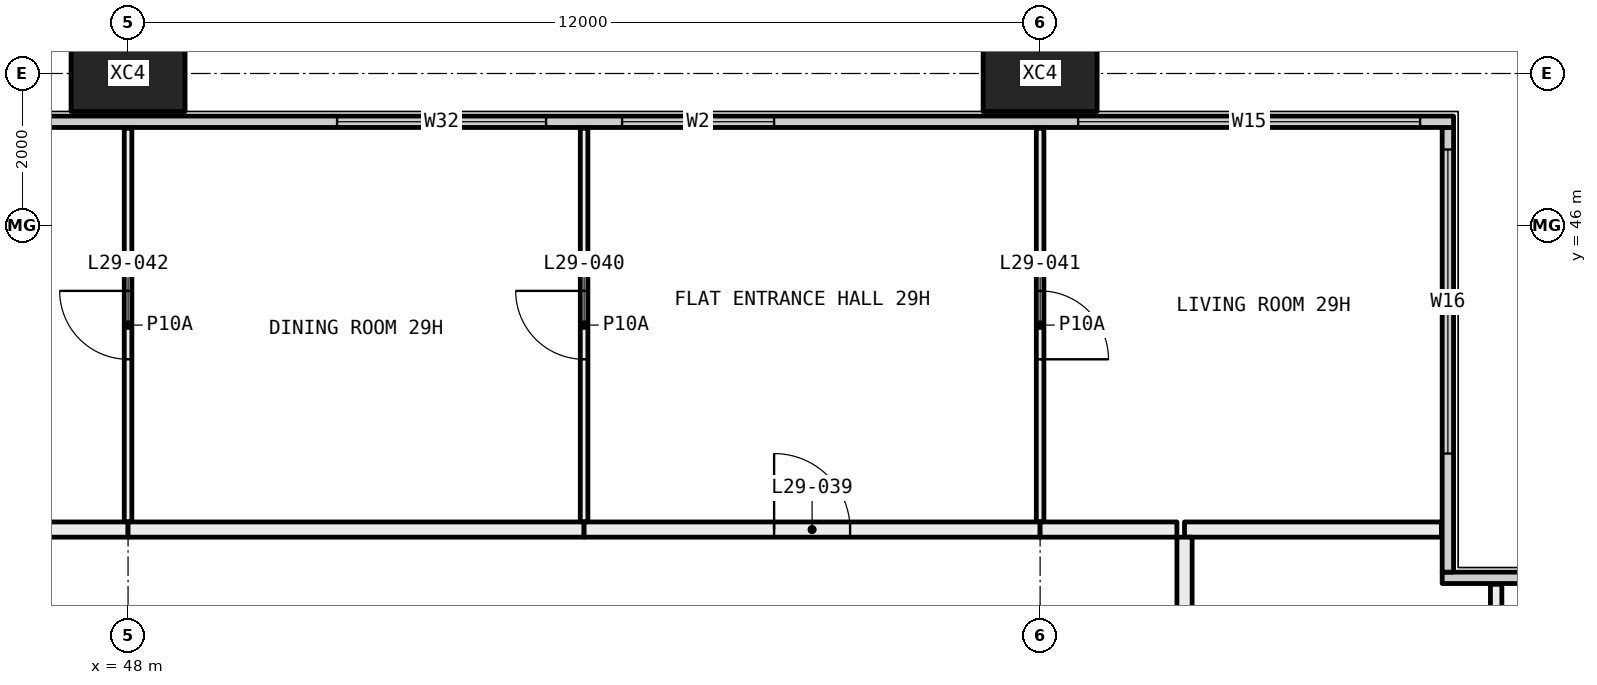
"""IFC4 building model, lengths in metres.
Left out: names, types, materials, properties, quantities, classifications, styles, units other than length and angle.
Written with IfcOpenShell. Run it as: python <this file> out.ifc"""

import sys

from ifc_helpers import new_model, si_unit, direction, frame, frame_2d, origin, origin_2d, place, context, subcontext, project, spatial, rectangle, hollow_rectangle, extrude, element, fill, save


model = new_model("IFC4")
c1 = context("Model", 3, precision=1e-05, world=origin(), true_north=direction((0.0, 1.0)))
c2 = subcontext(c1, "Body", "Model", "MODEL_VIEW")
j1 = project(units=[si_unit("LENGTHUNIT", "METRE"), si_unit("PLANEANGLEUNIT", "RADIAN")], contexts=[c1])
p1 = place(None, origin())
s1 = spatial("IfcSite", under=j1, at=p1, CompositionType="ELEMENT")
p2 = place(p1, origin())
s2 = spatial("IfcBuilding", under=s1, at=p2, CompositionType="ELEMENT")
p3 = place(p2, frame((0.0, 0.0, 113.85)))
s3 = spatial("IfcBuildingStorey", under=s2, at=p3, CompositionType="ELEMENT", Elevation=113.85)
for number, where, z_axis, x_axis in (
    (1, (48.0, 48.0, -0.4), (0.0, 0.0, 1.0), (1.0, 0.0, 0.0)),
    (2, (60.0, 48.0, -0.4), (0.0, 0.0, 1.0), (1.0, 0.0, 0.0)),
):
    element("IfcColumn", number, at=place(p3, frame(where, z_axis=z_axis, x_axis=x_axis)), inside=s3, PredefinedType="COLUMN", context=c2, shape_type="SweptSolid", body=[
        extrude(hollow_rectangle(XDim=1.5, YDim=1.0, WallThickness=0.06, at=origin_2d()), origin(), (0.0, 0.0, 1.0), 3.45),
    ])
p4 = place(p3, frame((65.29, 41.365, 0.0), z_axis=(0.0, 0.0, 1.0), x_axis=(1.0, 0.0, 0.0)))
e3 = element("IfcWall", 3, at=p4, inside=s3, PredefinedType="ELEMENTEDWALL", context=c2, shape_type="SweptSolid", body=[
    extrude(rectangle(XDim=6.15, YDim=0.15, at=frame_2d((3.075, 0.0))), origin(), (0.0, 0.0, 1.0), 3.05),
])
p5 = place(p4, frame((1.71, 0.0, 0.45)))
e4 = element("IfcOpeningElement", 4, at=p5, cuts=e3, PredefinedType="OPENING", context=c2, shape_type="SweptSolid", body=[
    extrude(rectangle(XDim=4.0, YDim=2.55, at=frame_2d((2.0, 1.275))), frame((0.0, 0.085, 0.0), z_axis=(0.0, -1.0, 0.0), x_axis=(1.0, 0.0, 0.0)), (0.0, 0.0, 1.0), 0.17),
])
p6 = place(p3, frame((65.365, 41.44, 0.0), z_axis=(0.0, 0.0, 1.0), x_axis=(0.0, 1.0, 0.0)))
e5 = element("IfcWall", 5, at=p6, inside=s3, PredefinedType="ELEMENTEDWALL", context=c2, shape_type="SweptSolid", body=[
    extrude(rectangle(XDim=5.85, YDim=0.15, at=frame_2d((2.925, 0.0))), origin(), (0.0, 0.0, 1.0), 3.05),
])
p7 = place(p6, frame((1.56, 0.0, 0.45)))
e6 = element("IfcOpeningElement", 6, at=p7, cuts=e5, PredefinedType="OPENING", context=c2, shape_type="SweptSolid", body=[
    extrude(rectangle(XDim=4.0, YDim=2.55, at=frame_2d((2.0, 1.275))), frame((0.0, 0.085, 0.0), z_axis=(0.0, -1.0, 0.0), x_axis=(1.0, 0.0, 0.0)), (0.0, 0.0, 1.0), 0.17),
])
p8 = place(p3, frame((6.56, 47.365, 0.0), z_axis=(0.0, 0.0, 1.0), x_axis=(1.0, 0.0, 0.0)))
e7 = element("IfcWall", 7, at=p8, inside=s3, PredefinedType="ELEMENTEDWALL", context=c2, shape_type="SweptSolid", body=[
    extrude(rectangle(XDim=58.88, YDim=0.15, at=frame_2d((29.44, 0.0))), origin(), (0.0, 0.0, 1.0), 3.05),
])
p9 = place(p8, frame((0.44, 0.0, 0.45)))
e8 = element("IfcOpeningElement", 8, at=p9, cuts=e7, PredefinedType="OPENING", context=c2, shape_type="SweptSolid", body=[
    extrude(rectangle(XDim=4.5, YDim=2.55, at=frame_2d((2.25, 1.275))), frame((0.0, 0.085, 0.0), z_axis=(0.0, -1.0, 0.0), x_axis=(1.0, 0.0, 0.0)), (0.0, 0.0, 1.0), 0.17),
])
p10 = place(p8, frame((8.19, 0.0, 0.45)))
e9 = element("IfcOpeningElement", 9, at=p10, cuts=e7, PredefinedType="OPENING", context=c2, shape_type="SweptSolid", body=[
    extrude(rectangle(XDim=2.75, YDim=2.55, at=frame_2d((1.375, 1.275))), frame((0.0, 0.085, 0.0), z_axis=(0.0, -1.0, 0.0), x_axis=(1.0, 0.0, 0.0)), (0.0, 0.0, 1.0), 0.17),
])
p11 = place(p8, frame((11.94, 0.0, 0.45)))
e10 = element("IfcOpeningElement", 10, at=p11, cuts=e7, PredefinedType="OPENING", context=c2, shape_type="SweptSolid", body=[
    extrude(rectangle(XDim=2.75, YDim=2.55, at=frame_2d((1.375, 1.275))), frame((0.0, 0.085, 0.0), z_axis=(0.0, -1.0, 0.0), x_axis=(1.0, 0.0, 0.0)), (0.0, 0.0, 1.0), 0.17),
])
p12 = place(p8, frame((20.19, 0.0, 0.45)))
e11 = element("IfcOpeningElement", 11, at=p12, cuts=e7, PredefinedType="OPENING", context=c2, shape_type="SweptSolid", body=[
    extrude(rectangle(XDim=2.75, YDim=2.55, at=frame_2d((1.375, 1.275))), frame((0.0, 0.085, 0.0), z_axis=(0.0, -1.0, 0.0), x_axis=(1.0, 0.0, 0.0)), (0.0, 0.0, 1.0), 0.17),
])
p13 = place(p8, frame((23.94, 0.0, 0.45)))
e12 = element("IfcOpeningElement", 12, at=p13, cuts=e7, PredefinedType="OPENING", context=c2, shape_type="SweptSolid", body=[
    extrude(rectangle(XDim=2.0, YDim=2.55, at=frame_2d((1.0, 1.275))), frame((0.0, 0.085, 0.0), z_axis=(0.0, -1.0, 0.0), x_axis=(1.0, 0.0, 0.0)), (0.0, 0.0, 1.0), 0.17),
])
p14 = place(p8, frame((32.19, 0.0, 0.45)))
e13 = element("IfcOpeningElement", 13, at=p14, cuts=e7, PredefinedType="OPENING", context=c2, shape_type="SweptSolid", body=[
    extrude(rectangle(XDim=2.75, YDim=2.55, at=frame_2d((1.375, 1.275))), frame((0.0, 0.085, 0.0), z_axis=(0.0, -1.0, 0.0), x_axis=(1.0, 0.0, 0.0)), (0.0, 0.0, 1.0), 0.17),
])
p15 = place(p8, frame((35.94, 0.0, 0.45)))
e14 = element("IfcOpeningElement", 14, at=p15, cuts=e7, PredefinedType="OPENING", context=c2, shape_type="SweptSolid", body=[
    extrude(rectangle(XDim=2.75, YDim=2.55, at=frame_2d((1.375, 1.275))), frame((0.0, 0.085, 0.0), z_axis=(0.0, -1.0, 0.0), x_axis=(1.0, 0.0, 0.0)), (0.0, 0.0, 1.0), 0.17),
])
p16 = place(p8, frame((44.19, 0.0, 0.45)))
e15 = element("IfcOpeningElement", 15, at=p16, cuts=e7, PredefinedType="OPENING", context=c2, shape_type="SweptSolid", body=[
    extrude(rectangle(XDim=2.75, YDim=2.55, at=frame_2d((1.375, 1.275))), frame((0.0, 0.085, 0.0), z_axis=(0.0, -1.0, 0.0), x_axis=(1.0, 0.0, 0.0)), (0.0, 0.0, 1.0), 0.17),
])
p17 = place(p8, frame((47.94, 0.0, 0.45)))
e16 = element("IfcOpeningElement", 16, at=p17, cuts=e7, PredefinedType="OPENING", context=c2, shape_type="SweptSolid", body=[
    extrude(rectangle(XDim=2.0, YDim=2.55, at=frame_2d((1.0, 1.275))), frame((0.0, 0.085, 0.0), z_axis=(0.0, -1.0, 0.0), x_axis=(1.0, 0.0, 0.0)), (0.0, 0.0, 1.0), 0.17),
])
p18 = place(p8, frame((53.94, 0.0, 0.45)))
e17 = element("IfcOpeningElement", 17, at=p18, cuts=e7, PredefinedType="OPENING", context=c2, shape_type="SweptSolid", body=[
    extrude(rectangle(XDim=4.5, YDim=2.55, at=frame_2d((2.25, 1.275))), frame((0.0, 0.085, 0.0), z_axis=(0.0, -1.0, 0.0), x_axis=(1.0, 0.0, 0.0)), (0.0, 0.0, 1.0), 0.17),
])
p19 = place(p3, frame((66.0, 41.28, 0.0), z_axis=(0.0, 0.0, 1.0), x_axis=(0.0, -1.0, 0.0)))
e18 = element("IfcWall", 18, at=p19, inside=s3, PredefinedType="PARTITIONING", context=c2, shape_type="SweptSolid", body=[
    extrude(rectangle(XDim=3.78, YDim=0.15, at=frame_2d((1.89, 0.0))), origin(), (0.0, 0.0, 1.0), 3.05),
])
p20 = place(p3, frame((65.28, 42.0, 0.0), z_axis=(0.0, 0.0, 1.0), x_axis=(-1.0, 0.0, 0.0)))
e19 = element("IfcWall", 19, at=p20, inside=s3, PredefinedType="PARTITIONING", context=c2, shape_type="SweptSolid", body=[
    extrude(rectangle(XDim=3.38, YDim=0.2, at=frame_2d((1.69, 0.0))), origin(), (0.0, 0.0, 1.0), 3.05),
])
p21 = place(p3, frame((61.9, 41.9, 0.0), z_axis=(0.0, 0.0, 1.0), x_axis=(0.0, -1.0, 0.0)))
e20 = element("IfcWall", 20, at=p21, inside=s3, PredefinedType="PARTITIONING", context=c2, shape_type="SweptSolid", body=[
    extrude(rectangle(XDim=4.4, YDim=0.2, at=frame_2d((2.2, 0.0))), origin(), (0.0, 0.0, 1.0), 3.05),
])
p22 = place(p3, frame((48.0, 42.1, 0.0), z_axis=(0.0, 0.0, 1.0), x_axis=(0.0, 1.0, 0.0)))
e21 = element("IfcWall", 21, at=p22, inside=s3, PredefinedType="PARTITIONING", context=c2, shape_type="SweptSolid", body=[
    extrude(rectangle(XDim=5.18, YDim=0.1, at=frame_2d((2.59, 0.0))), origin(), (0.0, 0.0, 1.0), 3.05),
])
p23 = place(p22, frame((2.14, 0.0, 0.0)))
e22 = element("IfcOpeningElement", 22, at=p23, cuts=e21, PredefinedType="OPENING", context=c2, shape_type="SweptSolid", body=[
    extrude(rectangle(XDim=0.9, YDim=2.1, at=frame_2d((0.45, 1.05))), frame((0.0, 0.06, 0.0), z_axis=(0.0, -1.0, 0.0), x_axis=(1.0, 0.0, 0.0)), (0.0, 0.0, 1.0), 0.12),
])
p24 = place(p3, frame((46.1, 42.0, 0.0), z_axis=(0.0, 0.0, 1.0), x_axis=(1.0, 0.0, 0.0)))
e23 = element("IfcWall", 23, at=p24, inside=s3, PredefinedType="PARTITIONING", context=c2, shape_type="SweptSolid", body=[
    extrude(rectangle(XDim=1.9, YDim=0.2, at=frame_2d((0.95, 0.0))), origin(), (0.0, 0.0, 1.0), 3.05),
])
p25 = place(p3, frame((54.0, 42.1, 0.0), z_axis=(0.0, 0.0, 1.0), x_axis=(0.0, 1.0, 0.0)))
e24 = element("IfcWall", 24, at=p25, inside=s3, PredefinedType="PARTITIONING", context=c2, shape_type="SweptSolid", body=[
    extrude(rectangle(XDim=5.18, YDim=0.1, at=frame_2d((2.59, 0.0))), origin(), (0.0, 0.0, 1.0), 3.05),
])
p26 = place(p25, frame((2.14, 0.0, 0.0)))
e25 = element("IfcOpeningElement", 25, at=p26, cuts=e24, PredefinedType="OPENING", context=c2, shape_type="SweptSolid", body=[
    extrude(rectangle(XDim=0.9, YDim=2.1, at=frame_2d((0.45, 1.05))), frame((0.0, 0.06, 0.0), z_axis=(0.0, -1.0, 0.0), x_axis=(1.0, 0.0, 0.0)), (0.0, 0.0, 1.0), 0.12),
])
p27 = place(p3, frame((48.0, 42.0, 0.0), z_axis=(0.0, 0.0, 1.0), x_axis=(1.0, 0.0, 0.0)))
e26 = element("IfcWall", 26, at=p27, inside=s3, PredefinedType="PARTITIONING", context=c2, shape_type="SweptSolid", body=[
    extrude(rectangle(XDim=6.0, YDim=0.2, at=frame_2d((3.0, 0.0))), origin(), (0.0, 0.0, 1.0), 3.05),
])
p28 = place(p3, frame((60.0, 42.1, 0.0), z_axis=(0.0, 0.0, 1.0), x_axis=(0.0, 1.0, 0.0)))
e27 = element("IfcWall", 27, at=p28, inside=s3, PredefinedType="PARTITIONING", context=c2, shape_type="SweptSolid", body=[
    extrude(rectangle(XDim=5.18, YDim=0.1, at=frame_2d((2.59, 0.0))), origin(), (0.0, 0.0, 1.0), 3.05),
])
p29 = place(p28, frame((2.14, 0.0, 0.0)))
e28 = element("IfcOpeningElement", 28, at=p29, cuts=e27, PredefinedType="OPENING", context=c2, shape_type="SweptSolid", body=[
    extrude(rectangle(XDim=0.9, YDim=2.1, at=frame_2d((0.45, 1.05))), frame((0.0, 0.06, 0.0), z_axis=(0.0, -1.0, 0.0), x_axis=(1.0, 0.0, 0.0)), (0.0, 0.0, 1.0), 0.12),
])
p30 = place(p3, frame((54.0, 42.0, 0.0), z_axis=(0.0, 0.0, 1.0), x_axis=(1.0, 0.0, 0.0)))
e29 = element("IfcWall", 29, at=p30, inside=s3, PredefinedType="PARTITIONING", context=c2, shape_type="SweptSolid", body=[
    extrude(rectangle(XDim=6.0, YDim=0.2, at=frame_2d((3.0, 0.0))), origin(), (0.0, 0.0, 1.0), 3.05),
])
p31 = place(p30, frame((2.5, 0.0, 0.0)))
e30 = element("IfcOpeningElement", 30, at=p31, cuts=e29, PredefinedType="OPENING", context=c2, shape_type="SweptSolid", body=[
    extrude(rectangle(XDim=1.0, YDim=2.1, at=frame_2d((0.5, 1.05))), frame((0.0, 0.11, 0.0), z_axis=(0.0, -1.0, 0.0), x_axis=(1.0, 0.0, 0.0)), (0.0, 0.0, 1.0), 0.22),
])
p32 = place(p3, frame((60.0, 42.0, 0.0), z_axis=(0.0, 0.0, 1.0), x_axis=(1.0, 0.0, 0.0)))
e31 = element("IfcWall", 31, at=p32, inside=s3, PredefinedType="PARTITIONING", context=c2, shape_type="SweptSolid", body=[
    extrude(rectangle(XDim=1.8, YDim=0.2, at=frame_2d((0.9, 0.0))), origin(), (0.0, 0.0, 1.0), 3.05),
])
p33 = place(p7, origin())
e32 = element("IfcWindow", 32, at=p33, inside=s3, PartitioningType="SINGLE_PANEL", PredefinedType="WINDOW", context=c2, shape_type="SweptSolid", body=[
    extrude(rectangle(XDim=4.0, YDim=2.55, at=frame_2d((2.0, 1.275))), frame((0.0, 0.03, 0.0), z_axis=(0.0, -1.0, 0.0), x_axis=(1.0, 0.0, 0.0)), (0.0, 0.0, 1.0), 0.06),
])
fill(e6, e32)
p34 = place(p16, origin())
e33 = element("IfcWindow", 33, at=p34, inside=s3, PartitioningType="SINGLE_PANEL", PredefinedType="WINDOW", context=c2, shape_type="SweptSolid", body=[
    extrude(rectangle(XDim=2.75, YDim=2.55, at=frame_2d((1.375, 1.275))), frame((0.0, 0.03, 0.0), z_axis=(0.0, -1.0, 0.0), x_axis=(1.0, 0.0, 0.0)), (0.0, 0.0, 1.0), 0.06),
])
fill(e15, e33)
p35 = place(p17, origin())
e34 = element("IfcWindow", 34, at=p35, inside=s3, PartitioningType="SINGLE_PANEL", PredefinedType="WINDOW", context=c2, shape_type="SweptSolid", body=[
    extrude(rectangle(XDim=2.0, YDim=2.55, at=frame_2d((1.0, 1.275))), frame((0.0, 0.03, 0.0), z_axis=(0.0, -1.0, 0.0), x_axis=(1.0, 0.0, 0.0)), (0.0, 0.0, 1.0), 0.06),
])
fill(e16, e34)
p36 = place(p18, origin())
e35 = element("IfcWindow", 35, at=p36, inside=s3, PartitioningType="SINGLE_PANEL", PredefinedType="WINDOW", context=c2, shape_type="SweptSolid", body=[
    extrude(rectangle(XDim=4.5, YDim=2.55, at=frame_2d((2.25, 1.275))), frame((0.0, 0.03, 0.0), z_axis=(0.0, -1.0, 0.0), x_axis=(1.0, 0.0, 0.0)), (0.0, 0.0, 1.0), 0.06),
])
fill(e17, e35)
p37 = place(p31, origin())
e36 = element("IfcDoor", 36, at=p37, inside=s3, OperationType="SINGLE_SWING_RIGHT", PredefinedType="DOOR", context=c2, shape_type="SweptSolid", body=[
    extrude(rectangle(XDim=1.0, YDim=2.1, at=frame_2d((0.5, 1.05))), frame((0.0, 0.025, 0.0), z_axis=(0.0, -1.0, 0.0), x_axis=(1.0, 0.0, 0.0)), (0.0, 0.0, 1.0), 0.05),
])
fill(e30, e36)
p38 = place(p26, origin())
e37 = element("IfcDoor", 37, at=p38, inside=s3, OperationType="SINGLE_SWING_LEFT", PredefinedType="DOOR", context=c2, shape_type="SweptSolid", body=[
    extrude(rectangle(XDim=0.9, YDim=2.1, at=frame_2d((0.45, 1.05))), frame((0.0, 0.025, 0.0), z_axis=(0.0, -1.0, 0.0), x_axis=(1.0, 0.0, 0.0)), (0.0, 0.0, 1.0), 0.05),
])
fill(e25, e37)
p39 = place(p29, frame((0.9, 0.0, 0.0), x_axis=(-1.0, 0.0, 0.0)))
e38 = element("IfcDoor", 38, at=p39, inside=s3, OperationType="SINGLE_SWING_LEFT", PredefinedType="DOOR", context=c2, shape_type="SweptSolid", body=[
    extrude(rectangle(XDim=0.9, YDim=2.1, at=frame_2d((0.45, 1.05))), frame((0.0, 0.025, 0.0), z_axis=(0.0, -1.0, 0.0), x_axis=(1.0, 0.0, 0.0)), (0.0, 0.0, 1.0), 0.05),
])
fill(e28, e38)
p40 = place(p23, origin())
e39 = element("IfcDoor", 39, at=p40, inside=s3, OperationType="SINGLE_SWING_LEFT", PredefinedType="DOOR", context=c2, shape_type="SweptSolid", body=[
    extrude(rectangle(XDim=0.9, YDim=2.1, at=frame_2d((0.45, 1.05))), frame((0.0, 0.025, 0.0), z_axis=(0.0, -1.0, 0.0), x_axis=(1.0, 0.0, 0.0)), (0.0, 0.0, 1.0), 0.05),
])
fill(e22, e39)
save(model, sys.argv[1])
